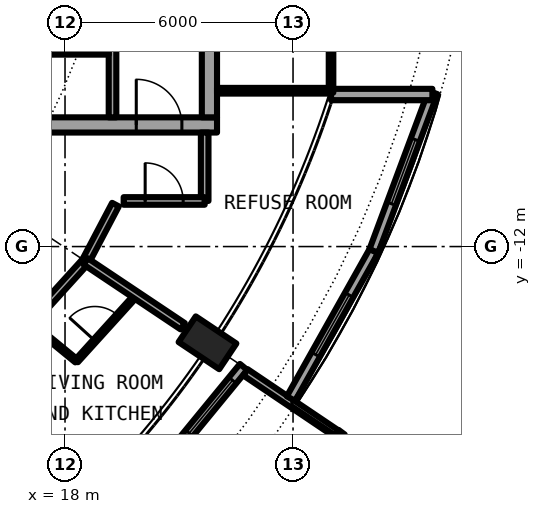
"""IFC4 building model, lengths in metres.
Left out: names, types, materials, properties, quantities, classifications, styles, units other than length and angle.
Written with IfcOpenShell. Run it as: python <this file> out.ifc"""

import sys

from ifc_helpers import new_model, si_unit, direction, frame, frame_2d, origin, origin_2d, place, context, subcontext, project, spatial, rectangle, circle, hollow_circle, extrude, element, fill, save


model = new_model("IFC4")
c1 = context("Model", 3, precision=1e-05, world=origin(), true_north=direction((0.0, 1.0)))
c2 = subcontext(c1, "Body", "Model", "MODEL_VIEW")
j1 = project(units=[si_unit("LENGTHUNIT", "METRE"), si_unit("PLANEANGLEUNIT", "RADIAN")], contexts=[c1])
p1 = place(None, origin())
s1 = spatial("IfcSite", under=j1, at=p1, CompositionType="ELEMENT")
p2 = place(p1, origin())
s2 = spatial("IfcBuilding", under=s1, at=p2, CompositionType="ELEMENT")
p3 = place(p2, frame((0.0, 0.0, 234.05)))
s3 = spatial("IfcBuildingStorey", under=s2, at=p3, CompositionType="ELEMENT", Elevation=234.05)
p4 = place(p3, frame((22.283, -14.889, 0.0), z_axis=(-0.346913947437, 0.231777820067, 0.908806775502), x_axis=(-0.555532669549, -0.831494710184, 0.0)))
e1 = element("IfcColumn", 1, at=p4, inside=s3, PredefinedType="COLUMN", context=c2, shape_type="SweptSolid", body=[
    extrude(hollow_circle(Radius=0.406, WallThickness=0.03, at=origin_2d()), origin(), (0.0, 0.0, 1.0), 3.081),
])
p5 = place(p3, frame((19.304, -19.304, 0.0), z_axis=(0.0, 0.0, 1.0), x_axis=(0.634382322723, 0.773019449054, 0.0)))
e2 = element("IfcWall", 2, at=p5, inside=s3, PredefinedType="SOLIDWALL", context=c2, shape_type="SweptSolid", body=[
    extrude(rectangle(XDim=5.352, YDim=0.25, at=frame_2d((2.676, 0.0))), origin(), (0.0, 0.0, 1.0), 2.7),
])
p6 = place(p5, frame((0.841, 0.0, 0.0)))
e3 = element("IfcOpeningElement", 3, at=p6, cuts=e2, PredefinedType="OPENING", context=c2, shape_type="SweptSolid", body=[
    extrude(rectangle(XDim=1.0, YDim=2.2, at=frame_2d((0.5, 1.1))), frame((0.0, 0.135, 0.0), z_axis=(0.0, -1.0, 0.0), x_axis=(1.0, 0.0, 0.0)), (0.0, 0.0, 1.0), 0.27),
])
p7 = place(p5, frame((3.096, 0.0, 0.3)))
e4 = element("IfcOpeningElement", 4, at=p7, cuts=e2, PredefinedType="OPENING", context=c2, shape_type="SweptSolid", body=[
    extrude(rectangle(XDim=1.8, YDim=2.1, at=frame_2d((0.9, 1.05))), frame((0.0, 0.135, 0.0), z_axis=(0.0, -1.0, 0.0), x_axis=(1.0, 0.0, 0.0)), (0.0, 0.0, 1.0), 0.27),
])
p8 = place(p3, frame((23.496, -19.289, -0.03), z_axis=(0.0, 0.0, 1.0), x_axis=(0.595908005124, 0.803052706508, 0.0)))
e5 = element("IfcWall", 5, at=p8, inside=s3, PredefinedType="SOLIDWALL", context=c2, shape_type="SweptSolid", body=[
    extrude(rectangle(XDim=2.994, YDim=0.2, at=frame_2d((1.497, 0.0))), origin(), (0.0, 0.0, 1.0), 2.73),
])
p9 = place(p8, frame((0.457, 0.0, 0.33)))
e6 = element("IfcOpeningElement", 6, at=p9, cuts=e5, PredefinedType="OPENING", context=c2, shape_type="SweptSolid", body=[
    extrude(circle(Radius=1.04, at=frame_2d((1.04, 1.04))), frame((0.0, 0.11, 0.0), z_axis=(0.0, -1.0, 0.0), x_axis=(1.0, 0.0, 0.0)), (0.0, 0.0, 1.0), 0.22),
])
p10 = place(p3, frame((22.746, -15.307, -0.03), z_axis=(0.0, 0.0, 1.0), x_axis=(0.829448139117, -0.558583730979, 0.0)))
e7 = element("IfcWall", 7, at=p10, inside=s3, PredefinedType="SOLIDWALL", context=c2, shape_type="SweptSolid", body=[
    extrude(rectangle(XDim=2.883, YDim=0.2, at=frame_2d((1.441, 0.0))), origin(), (0.0, 0.0, 1.0), 2.73),
])
p11 = place(p3, frame((23.946, -16.0, 0.0), z_axis=(0.0, 0.0, 1.0), x_axis=(0.489696356642, 0.871893042919, 0.0)))
e8 = element("IfcWall", 8, at=p11, inside=s3, PredefinedType="SOLIDWALL", context=c2, shape_type="SweptSolid", body=[
    extrude(rectangle(XDim=4.454, YDim=0.25, at=frame_2d((2.227, 0.0))), origin(), (0.0, 0.0, 1.0), 2.7),
])
p12 = place(p11, frame((1.327, 0.0, 0.3)))
e9 = element("IfcOpeningElement", 9, at=p12, cuts=e8, PredefinedType="OPENING", context=c2, shape_type="SweptSolid", body=[
    extrude(rectangle(XDim=1.8, YDim=2.1, at=frame_2d((0.9, 1.05))), frame((0.0, 0.135, 0.0), z_axis=(0.0, -1.0, 0.0), x_axis=(1.0, 0.0, 0.0)), (0.0, 0.0, 1.0), 0.27),
])
p13 = place(p3, frame((26.127, -12.117, 0.0), z_axis=(0.0, 0.0, 1.0), x_axis=(0.349247811493, 0.937030397675, 0.0)))
e10 = element("IfcWall", 10, at=p13, inside=s3, PredefinedType="SOLIDWALL", context=c2, shape_type="SweptSolid", body=[
    extrude(rectangle(XDim=4.452, YDim=0.25, at=frame_2d((2.226, 0.0))), origin(), (0.0, 0.0, 1.0), 2.7),
])
p14 = place(p13, frame((1.327, 0.0, 0.3)))
e11 = element("IfcOpeningElement", 11, at=p14, cuts=e10, PredefinedType="OPENING", context=c2, shape_type="SweptSolid", body=[
    extrude(rectangle(XDim=1.8, YDim=2.1, at=frame_2d((0.9, 1.05))), frame((0.0, 0.135, 0.0), z_axis=(0.0, -1.0, 0.0), x_axis=(1.0, 0.0, 0.0)), (0.0, 0.0, 1.0), 0.27),
])
p15 = place(p3, frame((25.0, -8.0, 0.0), z_axis=(0.0, 0.0, 1.0), x_axis=(1.0, 0.0, 0.0)))
e12 = element("IfcWall", 12, at=p15, inside=s3, PredefinedType="SOLIDWALL", context=c2, shape_type="SweptSolid", body=[
    extrude(rectangle(XDim=2.667, YDim=0.3, at=frame_2d((1.333, 0.0))), origin(), (0.0, 0.0, 1.0), 2.7),
])
p16 = place(p3, frame((8.6, -8.8, 0.0), z_axis=(0.0, 0.0, 1.0), x_axis=(1.0, 0.0, 0.0)))
e13 = element("IfcWall", 13, at=p16, inside=s3, PredefinedType="SHEAR", context=c2, shape_type="SweptSolid", body=[
    extrude(rectangle(XDim=13.4, YDim=0.4, at=frame_2d((6.7, 0.0))), origin(), (0.0, 0.0, 1.0), 3.05),
])
p17 = place(p16, frame((11.275, 0.0, 0.0)))
e14 = element("IfcOpeningElement", 14, at=p17, cuts=e13, PredefinedType="OPENING", context=c2, shape_type="SweptSolid", body=[
    extrude(rectangle(XDim=1.2, YDim=2.3, at=frame_2d((0.6, 1.15))), frame((0.0, 0.21, 0.0), z_axis=(0.0, -1.0, 0.0), x_axis=(1.0, 0.0, 0.0)), (0.0, 0.0, 1.0), 0.42),
])
p18 = place(p3, frame((21.8, 8.6, 0.0), z_axis=(0.0, 0.0, 1.0), x_axis=(0.0, -1.0, 0.0)))
e15 = element("IfcWall", 15, at=p18, inside=s3, PredefinedType="SHEAR", context=c2, shape_type="SweptSolid", body=[
    extrude(rectangle(XDim=17.2, YDim=0.4, at=frame_2d((8.6, 0.0))), origin(), (0.0, 0.0, 1.0), 3.05),
])
p19 = place(p18, frame((7.7, 0.0, 0.0)))
e16 = element("IfcOpeningElement", 16, at=p19, cuts=e15, PredefinedType="OPENING", context=c2, shape_type="SweptSolid", body=[
    extrude(rectangle(XDim=1.8, YDim=2.3, at=frame_2d((0.9, 1.15))), frame((0.0, 0.21, 0.0), z_axis=(0.0, -1.0, 0.0), x_axis=(1.0, 0.0, 0.0)), (0.0, 0.0, 1.0), 0.42),
])
p20 = place(p3, frame((19.25, -8.6, 0.0), z_axis=(0.0, 0.0, 1.0), x_axis=(0.0, 1.0, 0.0)))
e17 = element("IfcWall", 17, at=p20, inside=s3, PredefinedType="SOLIDWALL", context=c2, shape_type="SweptSolid", body=[
    extrude(rectangle(XDim=7.025, YDim=0.2, at=frame_2d((3.513, 0.0))), origin(), (0.0, 0.0, 1.0), 2.7),
])
p21 = place(p20, frame((2.35, 0.0, 0.0)))
e18 = element("IfcOpeningElement", 18, at=p21, cuts=e17, PredefinedType="OPENING", context=c2, shape_type="SweptSolid", body=[
    extrude(rectangle(XDim=1.1, YDim=2.3, at=frame_2d((0.55, 1.15))), frame((0.0, 0.11, 0.0), z_axis=(0.0, -1.0, 0.0), x_axis=(1.0, 0.0, 0.0)), (0.0, 0.0, 1.0), 0.22),
])
p22 = place(p3, frame((15.45, -6.875, 0.0), z_axis=(0.0, 0.0, 1.0), x_axis=(1.0, 0.0, 0.0)))
e19 = element("IfcWall", 19, at=p22, inside=s3, PredefinedType="PARTITIONING", context=c2, shape_type="SweptSolid", body=[
    extrude(rectangle(XDim=3.7, YDim=0.15, at=frame_2d((1.85, 0.0))), origin(), (0.0, 0.0, 1.0), 2.7),
])
p23 = place(p22, frame((1.4, 0.0, 0.0)))
e20 = element("IfcOpeningElement", 20, at=p23, cuts=e19, PredefinedType="OPENING", context=c2, shape_type="SweptSolid", body=[
    extrude(rectangle(XDim=0.9, YDim=2.3, at=frame_2d((0.45, 1.15))), frame((0.0, 0.085, 0.0), z_axis=(0.0, -1.0, 0.0), x_axis=(1.0, 0.0, 0.0)), (0.0, 0.0, 1.0), 0.17),
])
p24 = place(p3, frame((22.0, -7.9, 0.0), z_axis=(0.0, 0.0, 1.0), x_axis=(1.0, 0.0, 0.0)))
e21 = element("IfcWall", 21, at=p24, inside=s3, PredefinedType="PARTITIONING", context=c2, shape_type="SweptSolid", body=[
    extrude(rectangle(XDim=2.94, YDim=0.15, at=frame_2d((1.47, 0.0))), origin(), (0.0, 0.0, 1.0), 2.7),
])
p25 = place(p3, frame((25.0, -7.95, 0.0), z_axis=(0.0, 0.0, 1.0), x_axis=(0.0, 1.0, 0.0)))
e22 = element("IfcWall", 22, at=p25, inside=s3, PredefinedType="PARTITIONING", context=c2, shape_type="SweptSolid", body=[
    extrude(rectangle(XDim=15.9, YDim=0.12, at=frame_2d((7.95, 0.0))), origin(), (0.0, 0.0, 1.0), 2.7),
])
p26 = place(p25, frame((0.95, 0.0, 0.1)))
e23 = element("IfcOpeningElement", 23, at=p26, cuts=e22, PredefinedType="OPENING", context=c2, shape_type="SweptSolid", body=[
    extrude(rectangle(XDim=14.0, YDim=2.35, at=frame_2d((7.0, 1.175))), frame((0.0, 0.07, 0.0), z_axis=(0.0, -1.0, 0.0), x_axis=(1.0, 0.0, 0.0)), (0.0, 0.0, 1.0), 0.14),
])
p27 = place(p3, frame((18.302, -15.01, 0.0), z_axis=(0.0, 0.0, 1.0), x_axis=(0.671637685376, 0.740879760544, 0.0)))
e24 = element("IfcWall", 24, at=p27, inside=s3, PredefinedType="PARTITIONING", context=c2, shape_type="SweptSolid", body=[
    extrude(rectangle(XDim=2.338, YDim=0.1, at=frame_2d((1.169, 0.0))), origin(), (0.0, 0.0, 1.0), 2.7),
])
p28 = place(p27, frame((0.719, 0.0, 0.0)))
e25 = element("IfcOpeningElement", 25, at=p28, cuts=e24, PredefinedType="OPENING", context=c2, shape_type="SweptSolid", body=[
    extrude(rectangle(XDim=0.9, YDim=2.3, at=frame_2d((0.45, 1.15))), frame((0.0, 0.06, 0.0), z_axis=(0.0, -1.0, 0.0), x_axis=(1.0, 0.0, 0.0)), (0.0, 0.0, 1.0), 0.12),
])
p29 = place(p3, frame((18.542, -12.389, 0.0), z_axis=(0.0, 0.0, 1.0), x_axis=(0.465812036273, 0.88488369115, 0.0)))
e26 = element("IfcWall", 26, at=p29, inside=s3, PredefinedType="PARTITIONING", context=c2, shape_type="SweptSolid", body=[
    extrude(rectangle(XDim=1.687, YDim=0.2, at=frame_2d((0.844, 0.0))), origin(), (0.0, 0.0, 1.0), 2.7),
])
p30 = place(p3, frame((14.147, -17.238, 0.0), z_axis=(0.0, 0.0, 1.0), x_axis=(0.671561669125, 0.740948665268, 0.0)))
e27 = element("IfcWall", 27, at=p30, inside=s3, PredefinedType="PARTITIONING", context=c2, shape_type="SweptSolid", body=[
    extrude(rectangle(XDim=6.544, YDim=0.2, at=frame_2d((3.272, 0.0))), origin(), (0.0, 0.0, 1.0), 2.7),
])
p31 = place(p30, frame((1.682, 0.0, 0.0)))
e28 = element("IfcOpeningElement", 28, at=p31, cuts=e27, PredefinedType="OPENING", context=c2, shape_type="SweptSolid", body=[
    extrude(rectangle(XDim=1.0, YDim=2.3, at=frame_2d((0.5, 1.15))), frame((0.0, 0.11, 0.0), z_axis=(0.0, -1.0, 0.0), x_axis=(1.0, 0.0, 0.0)), (0.0, 0.0, 1.0), 0.22),
])
p32 = place(p3, frame((21.675, -10.8, 0.0), z_axis=(0.0, 0.0, 1.0), x_axis=(0.0, 1.0, 0.0)))
e29 = element("IfcWall", 29, at=p32, inside=s3, PredefinedType="PARTITIONING", context=c2, shape_type="SweptSolid", body=[
    extrude(rectangle(XDim=1.8, YDim=0.2, at=frame_2d((0.9, 0.0))), origin(), (0.0, 0.0, 1.0), 2.7),
])
p33 = place(p3, frame((19.543, -10.8, 0.0), z_axis=(0.0, 0.0, 1.0), x_axis=(1.0, 0.0, 0.0)))
e30 = element("IfcWall", 30, at=p33, inside=s3, PredefinedType="PARTITIONING", context=c2, shape_type="SweptSolid", body=[
    extrude(rectangle(XDim=2.132, YDim=0.2, at=frame_2d((1.066, 0.0))), origin(), (0.0, 0.0, 1.0), 2.7),
])
p34 = place(p33, frame((0.566, 0.0, 0.0)))
e31 = element("IfcOpeningElement", 31, at=p34, cuts=e30, PredefinedType="OPENING", context=c2, shape_type="SweptSolid", body=[
    extrude(rectangle(XDim=1.0, YDim=2.3, at=frame_2d((0.5, 1.15))), frame((0.0, 0.11, 0.0), z_axis=(0.0, -1.0, 0.0), x_axis=(1.0, 0.0, 0.0)), (0.0, 0.0, 1.0), 0.22),
])
p35 = place(p3, frame((17.077, -14.006, 0.0), z_axis=(0.0, 0.0, 1.0), x_axis=(0.773476341377, -0.633825172528, 0.0)))
e32 = element("IfcWall", 32, at=p35, inside=s3, PredefinedType="PARTITIONING", context=c2, shape_type="SweptSolid", body=[
    extrude(rectangle(XDim=1.584, YDim=0.1, at=frame_2d((0.792, 0.0))), origin(), (0.0, 0.0, 1.0), 2.7),
])
p36 = place(p3, frame((16.732, -16.743, 0.0), z_axis=(0.0, 0.0, 1.0), x_axis=(0.706967463531, -0.707246071398, 0.0)))
e33 = element("IfcWall", 33, at=p36, inside=s3, PredefinedType="PARTITIONING", context=c2, shape_type="SweptSolid", body=[
    extrude(rectangle(XDim=3.505, YDim=0.1, at=frame_2d((1.752, 0.0))), origin(), (0.0, 0.0, 1.0), 2.7),
])
p37 = place(p36, frame((1.303, 0.0, 0.0)))
e34 = element("IfcOpeningElement", 34, at=p37, cuts=e33, PredefinedType="OPENING", context=c2, shape_type="SweptSolid", body=[
    extrude(rectangle(XDim=0.9, YDim=2.3, at=frame_2d((0.45, 1.15))), frame((0.0, 0.06, 0.0), z_axis=(0.0, -1.0, 0.0), x_axis=(1.0, 0.0, 0.0)), (0.0, 0.0, 1.0), 0.12),
])
p38 = place(p3, frame((18.542, -12.389, 0.0), z_axis=(0.0, 0.0, 1.0), x_axis=(0.831340764735, -0.555763018642, 0.0)))
e35 = element("IfcWall", 35, at=p38, inside=s3, PredefinedType="PARTITIONING", context=c2, shape_type="SweptSolid", body=[
    extrude(rectangle(XDim=3.073, YDim=0.2, at=frame_2d((1.537, 0.0))), origin(), (0.0, 0.0, 1.0), 2.7),
])
p39 = place(p7, origin())
e36 = element("IfcWindow", 36, at=p39, inside=s3, PartitioningType="SINGLE_PANEL", PredefinedType="WINDOW", context=c2, shape_type="SweptSolid", body=[
    extrude(rectangle(XDim=1.8, YDim=2.1, at=frame_2d((0.9, 1.05))), frame((0.0, 0.03, 0.0), z_axis=(0.0, -1.0, 0.0), x_axis=(1.0, 0.0, 0.0)), (0.0, 0.0, 1.0), 0.06),
])
fill(e4, e36)
p40 = place(p12, origin())
e37 = element("IfcWindow", 37, at=p40, inside=s3, PartitioningType="SINGLE_PANEL", PredefinedType="WINDOW", context=c2, shape_type="SweptSolid", body=[
    extrude(rectangle(XDim=1.8, YDim=2.1, at=frame_2d((0.9, 1.05))), frame((0.0, 0.03, 0.0), z_axis=(0.0, -1.0, 0.0), x_axis=(1.0, 0.0, 0.0)), (0.0, 0.0, 1.0), 0.06),
])
fill(e9, e37)
p41 = place(p14, origin())
e38 = element("IfcWindow", 38, at=p41, inside=s3, PartitioningType="SINGLE_PANEL", PredefinedType="WINDOW", context=c2, shape_type="SweptSolid", body=[
    extrude(rectangle(XDim=1.8, YDim=2.1, at=frame_2d((0.9, 1.05))), frame((0.0, 0.03, 0.0), z_axis=(0.0, -1.0, 0.0), x_axis=(1.0, 0.0, 0.0)), (0.0, 0.0, 1.0), 0.06),
])
fill(e11, e38)
p42 = place(p23, origin())
e39 = element("IfcDoor", 39, at=p42, inside=s3, OperationType="SINGLE_SWING_LEFT", PredefinedType="DOOR", context=c2, shape_type="SweptSolid", body=[
    extrude(rectangle(XDim=0.9, YDim=2.3, at=frame_2d((0.45, 1.15))), frame((0.0, 0.025, 0.0), z_axis=(0.0, -1.0, 0.0), x_axis=(1.0, 0.0, 0.0)), (0.0, 0.0, 1.0), 0.05),
])
fill(e20, e39)
p43 = place(p17, origin())
e40 = element("IfcDoor", 40, at=p43, inside=s3, OperationType="SINGLE_SWING_LEFT", PredefinedType="DOOR", context=c2, shape_type="SweptSolid", body=[
    extrude(rectangle(XDim=1.2, YDim=2.3, at=frame_2d((0.6, 1.15))), frame((0.0, 0.025, 0.0), z_axis=(0.0, -1.0, 0.0), x_axis=(1.0, 0.0, 0.0)), (0.0, 0.0, 1.0), 0.05),
])
fill(e14, e40)
p44 = place(p26, origin())
e41 = element("IfcWindow", 41, at=p44, inside=s3, PartitioningType="SINGLE_PANEL", PredefinedType="WINDOW", context=c2, shape_type="SweptSolid", body=[
    extrude(rectangle(XDim=14.0, YDim=2.35, at=frame_2d((7.0, 1.175))), frame((0.0, 0.03, 0.0), z_axis=(0.0, -1.0, 0.0), x_axis=(1.0, 0.0, 0.0)), (0.0, 0.0, 1.0), 0.06),
])
fill(e23, e41)
p45 = place(p28, origin())
e42 = element("IfcDoor", 42, at=p45, inside=s3, OperationType="SINGLE_SWING_LEFT", PredefinedType="DOOR", context=c2, shape_type="SweptSolid", body=[
    extrude(rectangle(XDim=0.9, YDim=2.3, at=frame_2d((0.45, 1.15))), frame((0.0, 0.025, 0.0), z_axis=(0.0, -1.0, 0.0), x_axis=(1.0, 0.0, 0.0)), (0.0, 0.0, 1.0), 0.05),
])
fill(e25, e42)
p46 = place(p34, origin())
e43 = element("IfcDoor", 43, at=p46, inside=s3, OperationType="SINGLE_SWING_RIGHT", PredefinedType="DOOR", context=c2, shape_type="SweptSolid", body=[
    extrude(rectangle(XDim=1.0, YDim=2.3, at=frame_2d((0.5, 1.15))), frame((0.0, 0.025, 0.0), z_axis=(0.0, -1.0, 0.0), x_axis=(1.0, 0.0, 0.0)), (0.0, 0.0, 1.0), 0.05),
])
fill(e31, e43)
save(model, sys.argv[1])
